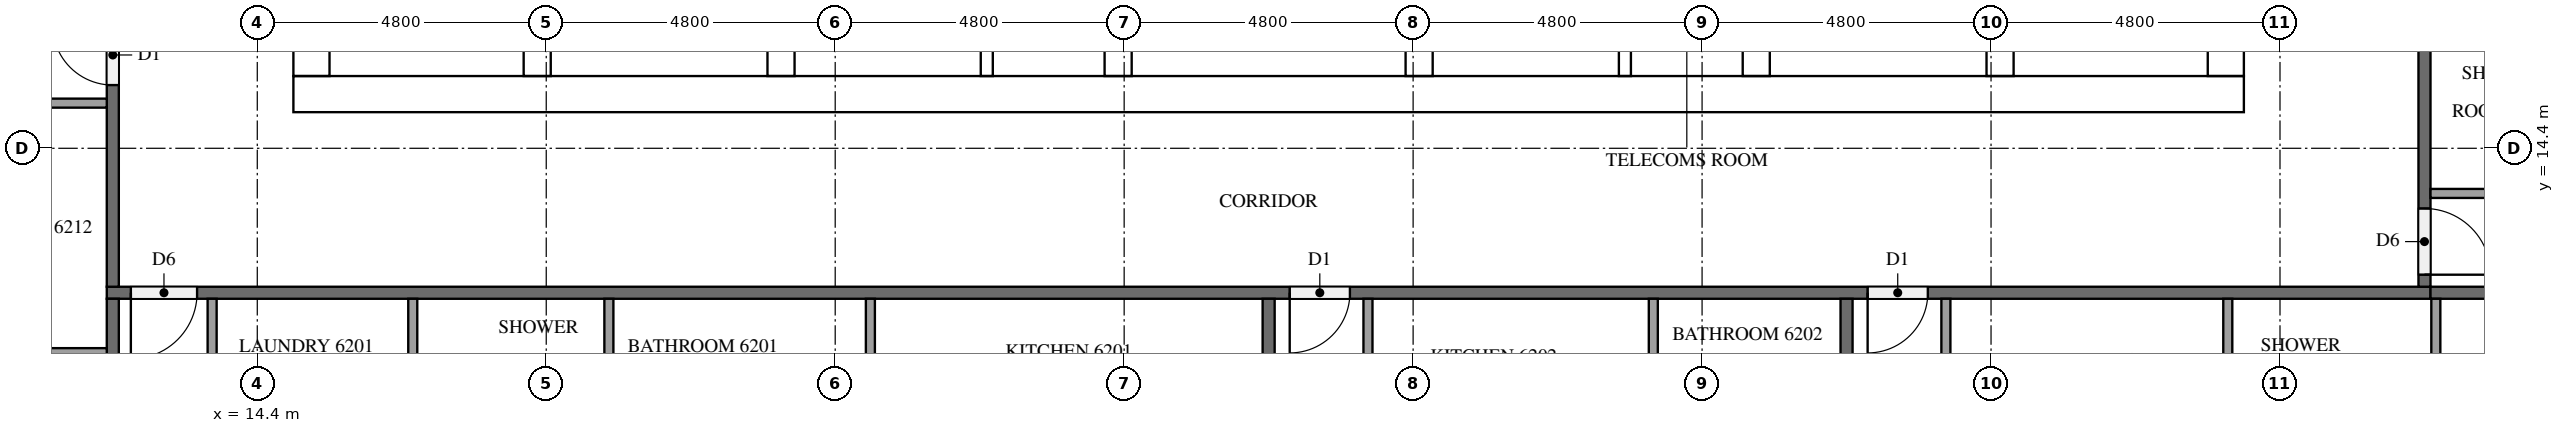
"""IFC4 building model, lengths in metres.
Left out: names, types, materials, properties, quantities, classifications, styles, units other than length and angle.
Written with IfcOpenShell. Run it as: python <this file> out.ifc"""

import sys

from ifc_helpers import new_model, si_unit, direction, frame, frame_2d, origin, place, context, subcontext, project, spatial, rectangle, extrude, element, fill, save


model = new_model("IFC4")
c1 = context("Model", 3, precision=1e-05, world=origin(), true_north=direction((0.0, 1.0)))
c2 = subcontext(c1, "Body", "Model", "MODEL_VIEW")
j1 = project(units=[si_unit("LENGTHUNIT", "METRE"), si_unit("PLANEANGLEUNIT", "RADIAN")], contexts=[c1])
p1 = place(None, origin())
s1 = spatial("IfcSite", under=j1, at=p1, CompositionType="ELEMENT")
p2 = place(p1, origin())
s2 = spatial("IfcBuilding", under=s1, at=p2, CompositionType="ELEMENT")
p3 = place(p2, frame((0.0, 0.0, 238.7)))
s3 = spatial("IfcBuildingStorey", under=s2, at=p3, CompositionType="ELEMENT", Elevation=238.7)
p4 = place(p3, frame((15.0, 15.3, 0.0), z_axis=(0.0, 0.0, 1.0), x_axis=(1.0, 0.0, 0.0)))
e1 = element("IfcWall", 1, at=p4, inside=s3, PredefinedType="SHEAR", context=c2, shape_type="SweptSolid", body=[
    extrude(rectangle(XDim=32.4, YDim=0.6, at=frame_2d((16.2, 0.0))), origin(), (0.0, 0.0, 1.0), 3.2),
])
p5 = place(p4, frame((15.3, 0.0, 0.0)))
e2 = element("IfcOpeningElement", 2, at=p5, cuts=e1, PredefinedType="OPENING", context=c2, shape_type="SweptSolid", body=[
    extrude(rectangle(XDim=1.8, YDim=2.1, at=frame_2d((0.9, 1.05))), frame((0.0, 0.31, 0.0), z_axis=(0.0, -1.0, 0.0), x_axis=(1.0, 0.0, 0.0)), (0.0, 0.0, 1.0), 0.62),
])
p6 = place(p3, frame((15.3, 15.6, 0.0), z_axis=(0.0, 0.0, 1.0), x_axis=(0.0, 1.0, 0.0)))
e3 = element("IfcWall", 3, at=p6, inside=s3, PredefinedType="SHEAR", context=c2, shape_type="SweptSolid", body=[
    extrude(rectangle(XDim=21.6, YDim=0.6, at=frame_2d((10.8, 0.0))), origin(), (0.0, 0.0, 1.0), 3.2),
])
p7 = place(p6, frame((5.16, 0.0, 0.0)))
e4 = element("IfcOpeningElement", 4, at=p7, cuts=e3, PredefinedType="OPENING", context=c2, shape_type="SweptSolid", body=[
    extrude(rectangle(XDim=1.2, YDim=2.1, at=frame_2d((0.6, 1.05))), frame((0.0, 0.31, 0.0), z_axis=(0.0, -1.0, 0.0), x_axis=(1.0, 0.0, 0.0)), (0.0, 0.0, 1.0), 0.62),
])
p8 = place(p3, frame((47.1, 15.6, 0.0), z_axis=(0.0, 0.0, 1.0), x_axis=(0.0, 1.0, 0.0)))
e5 = element("IfcWall", 5, at=p8, inside=s3, PredefinedType="SHEAR", context=c2, shape_type="SweptSolid", body=[
    extrude(rectangle(XDim=21.6, YDim=0.6, at=frame_2d((10.8, 0.0))), origin(), (0.0, 0.0, 1.0), 3.2),
])
p9 = place(p8, frame((10.5, 0.0, 0.0)))
e6 = element("IfcOpeningElement", 6, at=p9, cuts=e5, PredefinedType="OPENING", context=c2, shape_type="SweptSolid", body=[
    extrude(rectangle(XDim=1.2, YDim=2.1, at=frame_2d((0.6, 1.05))), frame((0.0, 0.31, 0.0), z_axis=(0.0, -1.0, 0.0), x_axis=(1.0, 0.0, 0.0)), (0.0, 0.0, 1.0), 0.62),
])
p10 = place(p3, frame((19.05, 15.6, 0.0), z_axis=(0.0, 0.0, 1.0), x_axis=(0.0, 1.0, 0.0)))
e7 = element("IfcWall", 7, at=p10, inside=s3, PredefinedType="SHEAR", context=c2, shape_type="SweptSolid", body=[
    extrude(rectangle(XDim=15.425, YDim=0.45, at=frame_2d((7.712, 0.0))), origin(), (0.0, 0.0, 1.0), 3.2),
])
p11 = place(p10, frame((9.85, 0.0, 0.0)))
e8 = element("IfcOpeningElement", 8, at=p11, cuts=e7, PredefinedType="OPENING", context=c2, shape_type="SweptSolid", body=[
    extrude(rectangle(XDim=1.1, YDim=2.1, at=frame_2d((0.55, 1.05))), frame((0.0, 0.235, 0.0), z_axis=(0.0, -1.0, 0.0), x_axis=(1.0, 0.0, 0.0)), (0.0, 0.0, 1.0), 0.47),
])
p12 = place(p10, frame((13.35, 0.0, 0.0)))
e9 = element("IfcOpeningElement", 9, at=p12, cuts=e7, PredefinedType="OPENING", context=c2, shape_type="SweptSolid", body=[
    extrude(rectangle(XDim=1.1, YDim=2.1, at=frame_2d((0.55, 1.05))), frame((0.0, 0.235, 0.0), z_axis=(0.0, -1.0, 0.0), x_axis=(1.0, 0.0, 0.0)), (0.0, 0.0, 1.0), 0.47),
])
p13 = place(p10, frame((0.6, 0.0, 0.0)))
e10 = element("IfcOpeningElement", 10, at=p13, cuts=e7, PredefinedType="OPENING", context=c2, shape_type="SweptSolid", body=[
    extrude(rectangle(XDim=1.2, YDim=2.1, at=frame_2d((0.6, 1.05))), frame((0.0, 0.235, 0.0), z_axis=(0.0, -1.0, 0.0), x_axis=(1.0, 0.0, 0.0)), (0.0, 0.0, 1.0), 0.47),
])
p14 = place(p3, frame((23.1, 15.6, 0.0), z_axis=(0.0, 0.0, 1.0), x_axis=(0.0, 1.0, 0.0)))
e11 = element("IfcWall", 11, at=p14, inside=s3, PredefinedType="SHEAR", context=c2, shape_type="SweptSolid", body=[
    extrude(rectangle(XDim=21.6, YDim=0.45, at=frame_2d((10.8, 0.0))), origin(), (0.0, 0.0, 1.0), 3.2),
])
p15 = place(p3, frame((39.3, 15.6, 0.0), z_axis=(0.0, 0.0, 1.0), x_axis=(0.0, 1.0, 0.0)))
e12 = element("IfcWall", 12, at=p15, inside=s3, PredefinedType="SHEAR", context=c2, shape_type="SweptSolid", body=[
    extrude(rectangle(XDim=8.65, YDim=0.45, at=frame_2d((4.325, 0.0))), origin(), (0.0, 0.0, 1.0), 3.2),
])
p16 = place(p3, frame((43.35, 15.6, 0.0), z_axis=(0.0, 0.0, 1.0), x_axis=(0.0, 1.0, 0.0)))
e13 = element("IfcWall", 13, at=p16, inside=s3, PredefinedType="SHEAR", context=c2, shape_type="SweptSolid", body=[
    extrude(rectangle(XDim=8.65, YDim=0.45, at=frame_2d((4.325, 0.0))), origin(), (0.0, 0.0, 1.0), 3.2),
])
p17 = place(p16, frame((0.6, 0.0, 0.0)))
e14 = element("IfcOpeningElement", 14, at=p17, cuts=e13, PredefinedType="OPENING", context=c2, shape_type="SweptSolid", body=[
    extrude(rectangle(XDim=1.2, YDim=2.1, at=frame_2d((0.6, 1.05))), frame((0.0, 0.235, 0.0), z_axis=(0.0, -1.0, 0.0), x_axis=(1.0, 0.0, 0.0)), (0.0, 0.0, 1.0), 0.47),
])
for number, where, z_axis, x_axis in (
    (15, (28.7, 15.6, 0.0), (0.0, 0.0, 1.0), (0.0, 1.0, 0.0)),
    (16, (33.7, 15.6, 0.0), (0.0, 0.0, 1.0), (0.0, 1.0, 0.0)),
):
    element("IfcWall", number, at=place(p3, frame(where, z_axis=z_axis, x_axis=x_axis)), inside=s3, PredefinedType="SHEAR", context=c2, shape_type="SweptSolid", body=[
        extrude(rectangle(XDim=2.925, YDim=0.45, at=frame_2d((1.462, 0.0))), origin(), (0.0, 0.0, 1.0), 3.2),
    ])
for number, where, z_axis, x_axis in (
    (17, (26.518, 15.6, 0.0), (0.0, 0.0, 1.0), (0.0, 1.0, 0.0)),
    (18, (37.118, 15.6, 0.0), (0.0, 0.0, 1.0), (0.0, 1.0, 0.0)),
):
    element("IfcWall", number, at=place(p3, frame(where, z_axis=z_axis, x_axis=x_axis)), inside=s3, PredefinedType="PARTITIONING", context=c2, shape_type="SweptSolid", body=[
        extrude(rectangle(XDim=2.925, YDim=0.2, at=frame_2d((1.462, 0.0))), origin(), (0.0, 0.0, 1.0), 3.2),
    ])
p18 = place(p3, frame((50.5, 12.0, 0.0), z_axis=(0.0, 0.0, 1.0), x_axis=(-1.0, 0.0, 0.0)))
e19 = element("IfcWall", 19, at=p18, inside=s3, PredefinedType="PARTITIONING", context=c2, shape_type="SweptSolid", body=[
    extrude(rectangle(XDim=38.6, YDim=0.2, at=frame_2d((19.3, 0.0))), origin(), (0.0, 0.0, 1.0), 3.2),
])
p19 = place(p18, frame((37.1, 0.0, 0.0)))
e20 = element("IfcOpeningElement", 20, at=p19, cuts=e19, PredefinedType="OPENING", context=c2, shape_type="SweptSolid", body=[
    extrude(rectangle(XDim=1.1, YDim=2.1, at=frame_2d((0.55, 1.05))), frame((0.0, 0.11, 0.0), z_axis=(0.0, -1.0, 0.0), x_axis=(1.0, 0.0, 0.0)), (0.0, 0.0, 1.0), 0.22),
])
p20 = place(p18, frame((17.95, 0.0, 0.0)))
e21 = element("IfcOpeningElement", 21, at=p20, cuts=e19, PredefinedType="OPENING", context=c2, shape_type="SweptSolid", body=[
    extrude(rectangle(XDim=1.0, YDim=2.1, at=frame_2d((0.5, 1.05))), frame((0.0, 0.11, 0.0), z_axis=(0.0, -1.0, 0.0), x_axis=(1.0, 0.0, 0.0)), (0.0, 0.0, 1.0), 0.22),
])
p21 = place(p18, frame((8.35, 0.0, 0.0)))
e22 = element("IfcOpeningElement", 22, at=p21, cuts=e19, PredefinedType="OPENING", context=c2, shape_type="SweptSolid", body=[
    extrude(rectangle(XDim=1.0, YDim=2.1, at=frame_2d((0.5, 1.05))), frame((0.0, 0.11, 0.0), z_axis=(0.0, -1.0, 0.0), x_axis=(1.0, 0.0, 0.0)), (0.0, 0.0, 1.0), 0.22),
])
p22 = place(p3, frame((50.4, 40.7, 0.0), z_axis=(0.0, 0.0, 1.0), x_axis=(0.0, -1.0, 0.0)))
e23 = element("IfcWall", 23, at=p22, inside=s3, PredefinedType="PARTITIONING", context=c2, shape_type="SweptSolid", body=[
    extrude(rectangle(XDim=28.6, YDim=0.2, at=frame_2d((14.3, 0.0))), origin(), (0.0, 0.0, 1.0), 3.2),
])
p23 = place(p22, frame((27.3, 0.0, 0.0)))
e24 = element("IfcOpeningElement", 24, at=p23, cuts=e23, PredefinedType="OPENING", context=c2, shape_type="SweptSolid", body=[
    extrude(rectangle(XDim=1.1, YDim=2.1, at=frame_2d((0.55, 1.05))), frame((0.0, 0.11, 0.0), z_axis=(0.0, -1.0, 0.0), x_axis=(1.0, 0.0, 0.0)), (0.0, 0.0, 1.0), 0.22),
])
p24 = place(p22, frame((0.25, 0.0, 0.0)))
e25 = element("IfcOpeningElement", 25, at=p24, cuts=e23, PredefinedType="OPENING", context=c2, shape_type="SweptSolid", body=[
    extrude(rectangle(XDim=1.0, YDim=2.1, at=frame_2d((0.5, 1.05))), frame((0.0, 0.11, 0.0), z_axis=(0.0, -1.0, 0.0), x_axis=(1.0, 0.0, 0.0)), (0.0, 0.0, 1.0), 0.22),
])
p25 = place(p3, frame((12.0, 12.1, 0.0), z_axis=(0.0, 0.0, 1.0), x_axis=(0.0, 1.0, 0.0)))
e26 = element("IfcWall", 26, at=p25, inside=s3, PredefinedType="PARTITIONING", context=c2, shape_type="SweptSolid", body=[
    extrude(rectangle(XDim=28.6, YDim=0.2, at=frame_2d((14.3, 0.0))), origin(), (0.0, 0.0, 1.0), 3.2),
])
p26 = place(p25, frame((27.35, 0.0, 0.0)))
e27 = element("IfcOpeningElement", 27, at=p26, cuts=e26, PredefinedType="OPENING", context=c2, shape_type="SweptSolid", body=[
    extrude(rectangle(XDim=1.0, YDim=2.1, at=frame_2d((0.5, 1.05))), frame((0.0, 0.11, 0.0), z_axis=(0.0, -1.0, 0.0), x_axis=(1.0, 0.0, 0.0)), (0.0, 0.0, 1.0), 0.22),
])
p27 = place(p25, frame((17.75, 0.0, 0.0)))
e28 = element("IfcOpeningElement", 28, at=p27, cuts=e26, PredefinedType="OPENING", context=c2, shape_type="SweptSolid", body=[
    extrude(rectangle(XDim=1.0, YDim=2.1, at=frame_2d((0.5, 1.05))), frame((0.0, 0.11, 0.0), z_axis=(0.0, -1.0, 0.0), x_axis=(1.0, 0.0, 0.0)), (0.0, 0.0, 1.0), 0.22),
])
p28 = place(p25, frame((3.35, 0.0, 0.0)))
e29 = element("IfcOpeningElement", 29, at=p28, cuts=e26, PredefinedType="OPENING", context=c2, shape_type="SweptSolid", body=[
    extrude(rectangle(XDim=1.0, YDim=2.1, at=frame_2d((0.5, 1.05))), frame((0.0, 0.11, 0.0), z_axis=(0.0, -1.0, 0.0), x_axis=(1.0, 0.0, 0.0)), (0.0, 0.0, 1.0), 0.22),
])
for number, where, z_axis, x_axis in (
    (30, (31.2, 11.9, 0.0), (0.0, 0.0, 1.0), (0.0, -1.0, 0.0)),
    (31, (12.0, 4.9, 0.0), (0.0, 0.0, 1.0), (0.0, 1.0, 0.0)),
    (32, (40.8, 11.9, 0.0), (0.0, 0.0, 1.0), (0.0, -1.0, 0.0)),
    (33, (50.5, 12.0, 0.0), (0.0, 0.0, 1.0), (1.0, 0.0, 0.0)),
):
    element("IfcWall", number, at=place(p3, frame(where, z_axis=z_axis, x_axis=x_axis)), inside=s3, PredefinedType="PARTITIONING", context=c2, shape_type="SweptSolid", body=[
        extrude(rectangle(XDim=7.0, YDim=0.2, at=frame_2d((3.5, 0.0))), origin(), (0.0, 0.0, 1.0), 3.2),
    ])
for number, where, z_axis, x_axis in (
    (34, (16.983, 11.9, 0.0), (0.0, 0.0, 1.0), (0.0, -1.0, 0.0)),
    (35, (20.24, 11.9, 0.0), (0.0, 0.0, 1.0), (0.0, -1.0, 0.0)),
    (36, (24.584, 11.9, 0.0), (0.0, 0.0, 1.0), (0.0, -1.0, 0.0)),
):
    element("IfcWall", number, at=place(p3, frame(where, z_axis=z_axis, x_axis=x_axis)), inside=s3, PredefinedType="PARTITIONING", context=c2, shape_type="SweptSolid", body=[
        extrude(rectangle(XDim=1.775, YDim=0.15, at=frame_2d((0.887, 0.0))), origin(), (0.0, 0.0, 1.0), 3.2),
    ])
for number, where, z_axis, x_axis in (
    (37, (13.65, 11.9, 0.0), (0.0, 0.0, 1.0), (0.0, -1.0, 0.0)),
    (38, (37.59, 11.9, 0.0), (0.0, 0.0, 1.0), (0.0, -1.0, 0.0)),
):
    element("IfcWall", number, at=place(p3, frame(where, z_axis=z_axis, x_axis=x_axis)), inside=s3, PredefinedType="PARTITIONING", context=c2, shape_type="SweptSolid", body=[
        extrude(rectangle(XDim=1.925, YDim=0.15, at=frame_2d((0.962, 0.0))), origin(), (0.0, 0.0, 1.0), 3.2),
    ])
for number, where, z_axis, x_axis in (
    (39, (32.85, 11.9, 0.0), (0.0, 0.0, 1.0), (0.0, -1.0, 0.0)),
    (40, (47.133, 11.9, 0.0), (0.0, 0.0, 1.0), (0.0, -1.0, 0.0)),
    (41, (50.588, 11.9, 0.0), (0.0, 0.0, 1.0), (0.0, -1.0, 0.0)),
):
    element("IfcWall", number, at=place(p3, frame(where, z_axis=z_axis, x_axis=x_axis)), inside=s3, PredefinedType="PARTITIONING", context=c2, shape_type="SweptSolid", body=[
        extrude(rectangle(XDim=2.075, YDim=0.15, at=frame_2d((1.038, 0.0))), origin(), (0.0, 0.0, 1.0), 3.2),
    ])
p29 = place(p3, frame((42.45, 11.9, 0.0), z_axis=(0.0, 0.0, 1.0), x_axis=(0.0, -1.0, 0.0)))
e42 = element("IfcWall", 42, at=p29, inside=s3, PredefinedType="PARTITIONING", context=c2, shape_type="SweptSolid", body=[
    extrude(rectangle(XDim=2.225, YDim=0.15, at=frame_2d((1.112, 0.0))), origin(), (0.0, 0.0, 1.0), 3.2),
])
p30 = place(p3, frame((50.5, 13.65, 0.0), z_axis=(0.0, 0.0, 1.0), x_axis=(1.0, 0.0, 0.0)))
e43 = element("IfcWall", 43, at=p30, inside=s3, PredefinedType="PARTITIONING", context=c2, shape_type="SweptSolid", body=[
    extrude(rectangle(XDim=2.525, YDim=0.15, at=frame_2d((1.262, 0.0))), origin(), (0.0, 0.0, 1.0), 3.2),
])
p31 = place(p3, frame((11.9, 11.005, 0.0), z_axis=(0.0, 0.0, 1.0), x_axis=(-1.0, 0.0, 0.0)))
e44 = element("IfcWall", 44, at=p31, inside=s3, PredefinedType="PARTITIONING", context=c2, shape_type="SweptSolid", body=[
    extrude(rectangle(XDim=2.975, YDim=0.15, at=frame_2d((1.487, 0.0))), origin(), (0.0, 0.0, 1.0), 3.2),
])
p32 = place(p3, frame((11.9, 15.15, 0.0), z_axis=(0.0, 0.0, 1.0), x_axis=(-1.0, 0.0, 0.0)))
e45 = element("IfcWall", 45, at=p32, inside=s3, PredefinedType="PARTITIONING", context=c2, shape_type="SweptSolid", body=[
    extrude(rectangle(XDim=3.125, YDim=0.15, at=frame_2d((1.562, 0.0))), origin(), (0.0, 0.0, 1.0), 3.2),
])
p33 = place(p5, frame((1.8, 0.0, 0.0), z_axis=(0.0, 0.0, 1.0), x_axis=(-1.0, 0.0, 0.0)))
e46 = element("IfcDoor", 46, at=p33, inside=s3, OperationType="DOUBLE_DOOR_SINGLE_SWING", PredefinedType="DOOR", context=c2, shape_type="SweptSolid", body=[
    extrude(rectangle(XDim=1.8, YDim=2.1, at=frame_2d((0.9, 1.05))), frame((0.0, 0.025, 0.0), z_axis=(0.0, -1.0, 0.0), x_axis=(1.0, 0.0, 0.0)), (0.0, 0.0, 1.0), 0.05),
])
fill(e2, e46)
p34 = place(p19, origin())
e47 = element("IfcDoor", 47, at=p34, inside=s3, OperationType="SINGLE_SWING_RIGHT", PredefinedType="DOOR", context=c2, shape_type="SweptSolid", body=[
    extrude(rectangle(XDim=1.1, YDim=2.1, at=frame_2d((0.55, 1.05))), frame((0.0, 0.025, 0.0), z_axis=(0.0, -1.0, 0.0), x_axis=(1.0, 0.0, 0.0)), (0.0, 0.0, 1.0), 0.05),
])
fill(e20, e47)
p35 = place(p20, origin())
e48 = element("IfcDoor", 48, at=p35, inside=s3, OperationType="SINGLE_SWING_RIGHT", PredefinedType="DOOR", context=c2, shape_type="SweptSolid", body=[
    extrude(rectangle(XDim=1.0, YDim=2.1, at=frame_2d((0.5, 1.05))), frame((0.0, 0.025, 0.0), z_axis=(0.0, -1.0, 0.0), x_axis=(1.0, 0.0, 0.0)), (0.0, 0.0, 1.0), 0.05),
])
fill(e21, e48)
p36 = place(p21, origin())
e49 = element("IfcDoor", 49, at=p36, inside=s3, OperationType="SINGLE_SWING_RIGHT", PredefinedType="DOOR", context=c2, shape_type="SweptSolid", body=[
    extrude(rectangle(XDim=1.0, YDim=2.1, at=frame_2d((0.5, 1.05))), frame((0.0, 0.025, 0.0), z_axis=(0.0, -1.0, 0.0), x_axis=(1.0, 0.0, 0.0)), (0.0, 0.0, 1.0), 0.05),
])
fill(e22, e49)
p37 = place(p23, origin())
e50 = element("IfcDoor", 50, at=p37, inside=s3, OperationType="SINGLE_SWING_RIGHT", PredefinedType="DOOR", context=c2, shape_type="SweptSolid", body=[
    extrude(rectangle(XDim=1.1, YDim=2.1, at=frame_2d((0.55, 1.05))), frame((0.0, 0.025, 0.0), z_axis=(0.0, -1.0, 0.0), x_axis=(1.0, 0.0, 0.0)), (0.0, 0.0, 1.0), 0.05),
])
fill(e24, e50)
p38 = place(p28, origin())
e51 = element("IfcDoor", 51, at=p38, inside=s3, OperationType="SINGLE_SWING_RIGHT", PredefinedType="DOOR", context=c2, shape_type="SweptSolid", body=[
    extrude(rectangle(XDim=1.0, YDim=2.1, at=frame_2d((0.5, 1.05))), frame((0.0, 0.025, 0.0), z_axis=(0.0, -1.0, 0.0), x_axis=(1.0, 0.0, 0.0)), (0.0, 0.0, 1.0), 0.05),
])
fill(e29, e51)
save(model, sys.argv[1])
